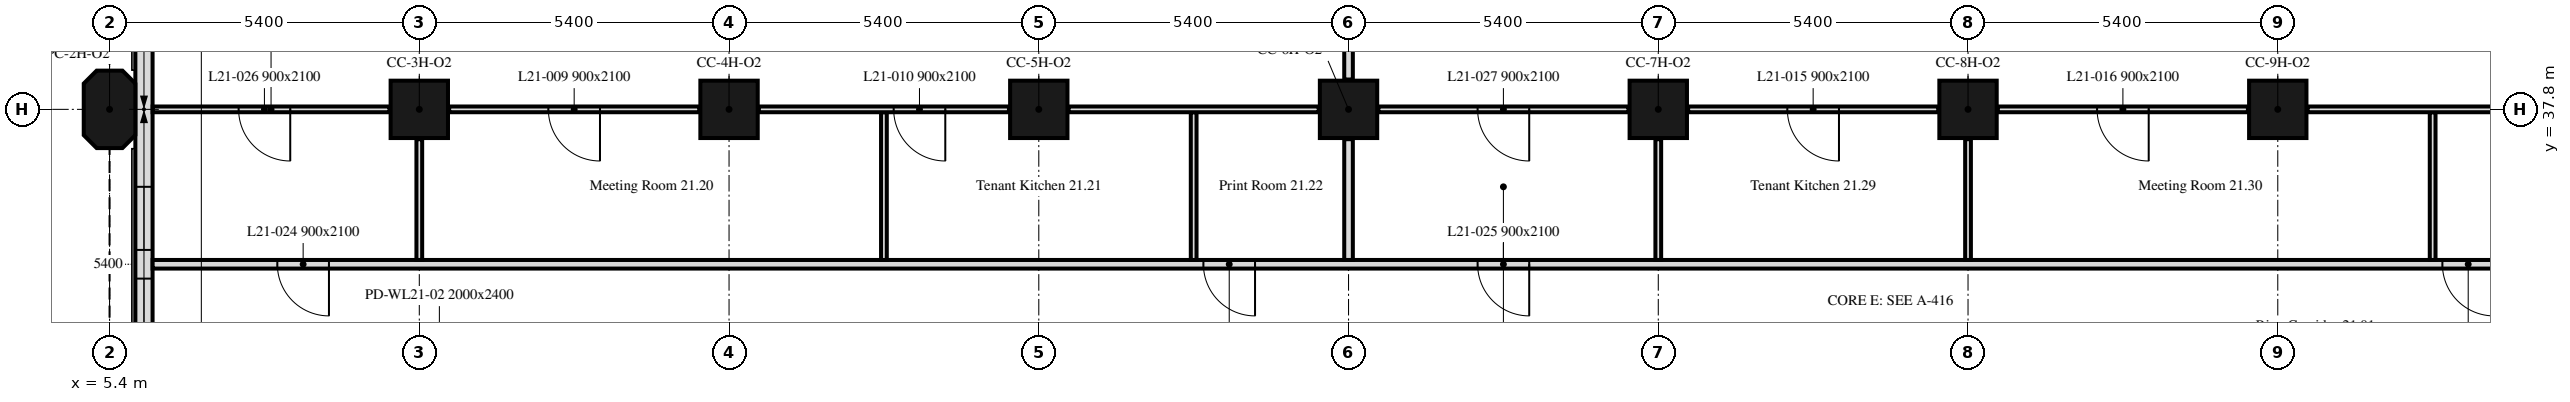
"""IFC4 building model, lengths in metres.
Left out: names, types, materials, properties, quantities, classifications, styles, units other than length and angle.
Written with IfcOpenShell. Run it as: python <this file> out.ifc"""

import sys

from ifc_helpers import new_model, si_unit, direction, frame, frame_2d, origin, origin_2d, place, context, subcontext, project, spatial, polyline, rectangle, outline, extrude, element, fill, save


model = new_model("IFC4")
c1 = context("Model", 3, precision=1e-05, world=origin(), true_north=direction((0.0, 1.0)))
c2 = subcontext(c1, "Body", "Model", "MODEL_VIEW")
j1 = project(units=[si_unit("LENGTHUNIT", "METRE"), si_unit("PLANEANGLEUNIT", "RADIAN")], contexts=[c1])
p1 = place(None, origin())
s1 = spatial("IfcSite", under=j1, at=p1, CompositionType="ELEMENT")
p2 = place(p1, origin())
s2 = spatial("IfcBuilding", under=s1, at=p2, CompositionType="ELEMENT")
p3 = place(p2, frame((0.0, 0.0, 91.6)))
s3 = spatial("IfcBuildingStorey", under=s2, at=p3, CompositionType="ELEMENT", Elevation=91.6)
p4 = place(p3, frame((5.4, 37.8, 0.0), z_axis=(0.0, 0.0, 1.0), x_axis=(0.0, 1.0, 0.0)))
e1 = element("IfcColumn", 1, at=p4, inside=s3, PredefinedType="COLUMN", context=c2, shape_type="SweptSolid", body=[
    extrude(outline(polyline([(-0.45, -0.45), (0.45, -0.45), (0.675, -0.225), (0.675, 0.225), (0.45, 0.45), (-0.45, 0.45), (-0.675, 0.225), (-0.675, -0.225), (-0.45, -0.45)])), origin(), (0.0, 0.0, 1.0), 3.5),
])
for number, where, z_axis, x_axis in (
    (2, (10.8, 37.8, 0.0), (0.0, 0.0, 1.0), (1.0, 0.0, 0.0)),
    (3, (16.2, 37.8, 0.0), (0.0, 0.0, 1.0), (1.0, 0.0, 0.0)),
    (4, (21.6, 37.8, 0.0), (0.0, 0.0, 1.0), (1.0, 0.0, 0.0)),
    (5, (27.0, 37.8, 0.0), (0.0, 0.0, 1.0), (1.0, 0.0, 0.0)),
    (6, (32.4, 37.8, 0.0), (0.0, 0.0, 1.0), (1.0, 0.0, 0.0)),
    (7, (37.8, 37.8, 0.0), (0.0, 0.0, 1.0), (1.0, 0.0, 0.0)),
    (8, (43.2, 37.8, 0.0), (0.0, 0.0, 1.0), (1.0, 0.0, 0.0)),
):
    element("IfcColumn", number, at=place(p3, frame(where, z_axis=z_axis, x_axis=x_axis)), inside=s3, PredefinedType="COLUMN", context=c2, shape_type="SweptSolid", body=[
        extrude(rectangle(XDim=1.0, YDim=1.0, at=origin_2d()), origin(), (0.0, 0.0, 1.0), 3.5),
    ])
p5 = place(p3, frame((6.0, 43.014, 0.0), z_axis=(0.0, 0.0, 1.0), x_axis=(0.0, -1.0, 0.0)))
e9 = element("IfcWall", 9, at=p5, inside=s3, PredefinedType="SOLIDWALL", context=c2, shape_type="SweptSolid", body=[
    extrude(rectangle(XDim=10.614, YDim=0.3, at=frame_2d((5.307, 0.0))), origin(), (0.0, 0.0, 1.0), 3.5),
])
p6 = place(p5, frame((6.564, 0.0, 0.9)))
e10 = element("IfcOpeningElement", 10, at=p6, cuts=e9, PredefinedType="OPENING", context=c2, shape_type="SweptSolid", body=[
    extrude(rectangle(XDim=1.1, YDim=1.7, at=frame_2d((0.55, 0.85))), frame((0.0, 0.16, 0.0), z_axis=(0.0, -1.0, 0.0), x_axis=(1.0, 0.0, 0.0)), (0.0, 0.0, 1.0), 0.32),
])
p7 = place(p5, frame((8.164, 0.0, 0.9)))
e11 = element("IfcOpeningElement", 11, at=p7, cuts=e9, PredefinedType="OPENING", context=c2, shape_type="SweptSolid", body=[
    extrude(rectangle(XDim=1.1, YDim=1.7, at=frame_2d((0.55, 0.85))), frame((0.0, 0.16, 0.0), z_axis=(0.0, -1.0, 0.0), x_axis=(1.0, 0.0, 0.0)), (0.0, 0.0, 1.0), 0.32),
])
p8 = place(p3, frame((47.849, 35.1, 0.0), z_axis=(0.0, 0.0, 1.0), x_axis=(-1.0, 0.0, 0.0)))
e12 = element("IfcWall", 12, at=p8, inside=s3, PredefinedType="PARTITIONING", context=c2, shape_type="SweptSolid", body=[
    extrude(rectangle(XDim=41.698, YDim=0.15, at=frame_2d((20.849, 0.0))), origin(), (0.0, 0.0, 1.0), 2.75),
])
p9 = place(p8, frame((22.479, 0.0, 0.0)))
e13 = element("IfcOpeningElement", 13, at=p9, cuts=e12, PredefinedType="OPENING", context=c2, shape_type="SweptSolid", body=[
    extrude(rectangle(XDim=0.9, YDim=2.1, at=frame_2d((0.45, 1.05))), frame((0.0, 0.075, 0.0), z_axis=(0.0, -1.0, 0.0), x_axis=(1.0, 0.0, 0.0)), (0.0, 0.0, 1.0), 0.15),
])
p10 = place(p8, frame((0.879, 0.0, 0.0)))
e14 = element("IfcOpeningElement", 14, at=p10, cuts=e12, PredefinedType="OPENING", context=c2, shape_type="SweptSolid", body=[
    extrude(rectangle(XDim=0.9, YDim=2.1, at=frame_2d((0.45, 1.05))), frame((0.0, 0.075, 0.0), z_axis=(0.0, -1.0, 0.0), x_axis=(1.0, 0.0, 0.0)), (0.0, 0.0, 1.0), 0.15),
])
p11 = place(p8, frame((38.624, 0.0, 0.0)))
e15 = element("IfcOpeningElement", 15, at=p11, cuts=e12, PredefinedType="OPENING", context=c2, shape_type="SweptSolid", body=[
    extrude(rectangle(XDim=0.9, YDim=2.1, at=frame_2d((0.45, 1.05))), frame((0.0, 0.075, 0.0), z_axis=(0.0, -1.0, 0.0), x_axis=(1.0, 0.0, 0.0)), (0.0, 0.0, 1.0), 0.15),
])
p12 = place(p8, frame((17.699, 0.0, 0.0)))
e16 = element("IfcOpeningElement", 16, at=p12, cuts=e12, PredefinedType="OPENING", context=c2, shape_type="SweptSolid", body=[
    extrude(rectangle(XDim=0.9, YDim=2.1, at=frame_2d((0.45, 1.05))), frame((0.0, 0.075, 0.0), z_axis=(0.0, -1.0, 0.0), x_axis=(1.0, 0.0, 0.0)), (0.0, 0.0, 1.0), 0.15),
])
p13 = place(p3, frame((10.28, 37.8, 0.0), z_axis=(0.0, 0.0, 1.0), x_axis=(-1.0, 0.0, 0.0)))
e17 = element("IfcWall", 17, at=p13, inside=s3, PredefinedType="PARTITIONING", context=c2, shape_type="SweptSolid", body=[
    extrude(rectangle(XDim=4.129, YDim=0.1, at=frame_2d((2.064, 0.0))), origin(), (0.0, 0.0, 1.0), 2.75),
])
p14 = place(p13, frame((1.73, 0.0, 0.0)))
e18 = element("IfcOpeningElement", 18, at=p14, cuts=e17, PredefinedType="OPENING", context=c2, shape_type="SweptSolid", body=[
    extrude(rectangle(XDim=0.9, YDim=2.1, at=frame_2d((0.45, 1.05))), frame((0.0, 0.05, 0.0), z_axis=(0.0, -1.0, 0.0), x_axis=(1.0, 0.0, 0.0)), (0.0, 0.0, 1.0), 0.1),
])
p15 = place(p3, frame((10.8, 35.175, 0.0), z_axis=(0.0, 0.0, 1.0), x_axis=(0.0, 1.0, 0.0)))
e19 = element("IfcWall", 19, at=p15, inside=s3, PredefinedType="PARTITIONING", context=c2, shape_type="SweptSolid", body=[
    extrude(rectangle(XDim=2.105, YDim=0.1, at=frame_2d((1.052, 0.0))), origin(), (0.0, 0.0, 1.0), 2.75),
])
p16 = place(p3, frame((18.9, 35.175, 0.0), z_axis=(0.0, 0.0, 1.0), x_axis=(0.0, 1.0, 0.0)))
e20 = element("IfcWall", 20, at=p16, inside=s3, PredefinedType="PARTITIONING", context=c2, shape_type="SweptSolid", body=[
    extrude(rectangle(XDim=2.575, YDim=0.1, at=frame_2d((1.288, 0.0))), origin(), (0.0, 0.0, 1.0), 3.5),
])
p17 = place(p3, frame((15.68, 37.8, 0.0), z_axis=(0.0, 0.0, 1.0), x_axis=(-1.0, 0.0, 0.0)))
e21 = element("IfcWall", 21, at=p17, inside=s3, PredefinedType="PARTITIONING", context=c2, shape_type="SweptSolid", body=[
    extrude(rectangle(XDim=4.36, YDim=0.1, at=frame_2d((2.18, 0.0))), origin(), (0.0, 0.0, 1.0), 2.75),
])
p18 = place(p17, frame((1.73, 0.0, 0.0)))
e22 = element("IfcOpeningElement", 22, at=p18, cuts=e21, PredefinedType="OPENING", context=c2, shape_type="SweptSolid", body=[
    extrude(rectangle(XDim=0.9, YDim=2.1, at=frame_2d((0.45, 1.05))), frame((0.0, 0.05, 0.0), z_axis=(0.0, -1.0, 0.0), x_axis=(1.0, 0.0, 0.0)), (0.0, 0.0, 1.0), 0.1),
])
p19 = place(p3, frame((24.3, 35.175, 0.0), z_axis=(0.0, 0.0, 1.0), x_axis=(0.0, 1.0, 0.0)))
e23 = element("IfcWall", 23, at=p19, inside=s3, PredefinedType="PARTITIONING", context=c2, shape_type="SweptSolid", body=[
    extrude(rectangle(XDim=2.575, YDim=0.1, at=frame_2d((1.288, 0.0))), origin(), (0.0, 0.0, 1.0), 3.5),
])
p20 = place(p3, frame((21.08, 37.8, 0.0), z_axis=(0.0, 0.0, 1.0), x_axis=(-1.0, 0.0, 0.0)))
e24 = element("IfcWall", 24, at=p20, inside=s3, PredefinedType="PARTITIONING", context=c2, shape_type="SweptSolid", body=[
    extrude(rectangle(XDim=4.36, YDim=0.1, at=frame_2d((2.18, 0.0))), origin(), (0.0, 0.0, 1.0), 3.5),
])
p21 = place(p20, frame((1.11, 0.0, 0.0)))
e25 = element("IfcOpeningElement", 25, at=p21, cuts=e24, PredefinedType="OPENING", context=c2, shape_type="SweptSolid", body=[
    extrude(rectangle(XDim=0.9, YDim=2.1, at=frame_2d((0.45, 1.05))), frame((0.0, 0.05, 0.0), z_axis=(0.0, -1.0, 0.0), x_axis=(1.0, 0.0, 0.0)), (0.0, 0.0, 1.0), 0.1),
])
p22 = place(p3, frame((27.0, 35.175, 0.0), z_axis=(0.0, 0.0, 1.0), x_axis=(0.0, 1.0, 0.0)))
e26 = element("IfcWall", 26, at=p22, inside=s3, PredefinedType="PARTITIONING", context=c2, shape_type="SweptSolid", body=[
    extrude(rectangle(XDim=2.105, YDim=0.15, at=frame_2d((1.052, 0.0))), origin(), (0.0, 0.0, 1.0), 2.75),
])
p23 = place(p3, frame((26.48, 37.8, 0.0), z_axis=(0.0, 0.0, 1.0), x_axis=(-1.0, 0.0, 0.0)))
e27 = element("IfcWall", 27, at=p23, inside=s3, PredefinedType="PARTITIONING", context=c2, shape_type="SweptSolid", body=[
    extrude(rectangle(XDim=4.36, YDim=0.1, at=frame_2d((2.18, 0.0))), origin(), (0.0, 0.0, 1.0), 3.5),
])
p24 = place(p3, frame((27.0, 38.32, 0.0), z_axis=(0.0, 0.0, 1.0), x_axis=(0.0, 1.0, 0.0)))
e28 = element("IfcWall", 28, at=p24, inside=s3, PredefinedType="PARTITIONING", context=c2, shape_type="SweptSolid", body=[
    extrude(rectangle(XDim=4.36, YDim=0.15, at=frame_2d((2.18, 0.0))), origin(), (0.0, 0.0, 1.0), 2.75),
])
p25 = place(p3, frame((32.4, 35.175, 0.0), z_axis=(0.0, 0.0, 1.0), x_axis=(0.0, 1.0, 0.0)))
e29 = element("IfcWall", 29, at=p25, inside=s3, PredefinedType="PARTITIONING", context=c2, shape_type="SweptSolid", body=[
    extrude(rectangle(XDim=2.105, YDim=0.1, at=frame_2d((1.052, 0.0))), origin(), (0.0, 0.0, 1.0), 2.75),
])
p26 = place(p3, frame((31.88, 37.8, 0.0), z_axis=(0.0, 0.0, 1.0), x_axis=(-1.0, 0.0, 0.0)))
e30 = element("IfcWall", 30, at=p26, inside=s3, PredefinedType="PARTITIONING", context=c2, shape_type="SweptSolid", body=[
    extrude(rectangle(XDim=4.36, YDim=0.1, at=frame_2d((2.18, 0.0))), origin(), (0.0, 0.0, 1.0), 3.5),
])
p27 = place(p26, frame((1.73, 0.0, 0.0)))
e31 = element("IfcOpeningElement", 31, at=p27, cuts=e30, PredefinedType="OPENING", context=c2, shape_type="SweptSolid", body=[
    extrude(rectangle(XDim=0.9, YDim=2.1, at=frame_2d((0.45, 1.05))), frame((0.0, 0.05, 0.0), z_axis=(0.0, -1.0, 0.0), x_axis=(1.0, 0.0, 0.0)), (0.0, 0.0, 1.0), 0.1),
])
p28 = place(p3, frame((37.8, 35.175, 0.0), z_axis=(0.0, 0.0, 1.0), x_axis=(0.0, 1.0, 0.0)))
e32 = element("IfcWall", 32, at=p28, inside=s3, PredefinedType="PARTITIONING", context=c2, shape_type="SweptSolid", body=[
    extrude(rectangle(XDim=2.105, YDim=0.1, at=frame_2d((1.052, 0.0))), origin(), (0.0, 0.0, 1.0), 2.75),
])
p29 = place(p3, frame((37.28, 37.8, 0.0), z_axis=(0.0, 0.0, 1.0), x_axis=(-1.0, 0.0, 0.0)))
e33 = element("IfcWall", 33, at=p29, inside=s3, PredefinedType="PARTITIONING", context=c2, shape_type="SweptSolid", body=[
    extrude(rectangle(XDim=4.36, YDim=0.1, at=frame_2d((2.18, 0.0))), origin(), (0.0, 0.0, 1.0), 2.75),
])
p30 = place(p29, frame((1.73, 0.0, 0.0)))
e34 = element("IfcOpeningElement", 34, at=p30, cuts=e33, PredefinedType="OPENING", context=c2, shape_type="SweptSolid", body=[
    extrude(rectangle(XDim=0.9, YDim=2.1, at=frame_2d((0.45, 1.05))), frame((0.0, 0.05, 0.0), z_axis=(0.0, -1.0, 0.0), x_axis=(1.0, 0.0, 0.0)), (0.0, 0.0, 1.0), 0.1),
])
p31 = place(p3, frame((45.9, 35.175, 0.0), z_axis=(0.0, 0.0, 1.0), x_axis=(0.0, 1.0, 0.0)))
e35 = element("IfcWall", 35, at=p31, inside=s3, PredefinedType="PARTITIONING", context=c2, shape_type="SweptSolid", body=[
    extrude(rectangle(XDim=2.575, YDim=0.1, at=frame_2d((1.288, 0.0))), origin(), (0.0, 0.0, 1.0), 3.5),
])
p32 = place(p3, frame((42.68, 37.8, 0.0), z_axis=(0.0, 0.0, 1.0), x_axis=(-1.0, 0.0, 0.0)))
e36 = element("IfcWall", 36, at=p32, inside=s3, PredefinedType="PARTITIONING", context=c2, shape_type="SweptSolid", body=[
    extrude(rectangle(XDim=4.36, YDim=0.1, at=frame_2d((2.18, 0.0))), origin(), (0.0, 0.0, 1.0), 2.75),
])
p33 = place(p32, frame((1.73, 0.0, 0.0)))
e37 = element("IfcOpeningElement", 37, at=p33, cuts=e36, PredefinedType="OPENING", context=c2, shape_type="SweptSolid", body=[
    extrude(rectangle(XDim=0.9, YDim=2.1, at=frame_2d((0.45, 1.05))), frame((0.0, 0.05, 0.0), z_axis=(0.0, -1.0, 0.0), x_axis=(1.0, 0.0, 0.0)), (0.0, 0.0, 1.0), 0.1),
])
p34 = place(p3, frame((47.849, 37.8, 0.0), z_axis=(0.0, 0.0, 1.0), x_axis=(-1.0, 0.0, 0.0)))
e38 = element("IfcWall", 38, at=p34, inside=s3, PredefinedType="PARTITIONING", context=c2, shape_type="SweptSolid", body=[
    extrude(rectangle(XDim=4.129, YDim=0.1, at=frame_2d((2.064, 0.0))), origin(), (0.0, 0.0, 1.0), 2.75),
])
p35 = place(p6, origin())
e39 = element("IfcWindow", 39, at=p35, inside=s3, PartitioningType="SINGLE_PANEL", PredefinedType="WINDOW", context=c2, shape_type="SweptSolid", body=[
    extrude(rectangle(XDim=1.1, YDim=1.7, at=frame_2d((0.55, 0.85))), frame((0.0, 0.03, 0.0), z_axis=(0.0, -1.0, 0.0), x_axis=(1.0, 0.0, 0.0)), (0.0, 0.0, 1.0), 0.06),
])
fill(e10, e39)
p36 = place(p7, origin())
e40 = element("IfcWindow", 40, at=p36, inside=s3, PartitioningType="SINGLE_PANEL", PredefinedType="WINDOW", context=c2, shape_type="SweptSolid", body=[
    extrude(rectangle(XDim=1.1, YDim=1.7, at=frame_2d((0.55, 0.85))), frame((0.0, 0.03, 0.0), z_axis=(0.0, -1.0, 0.0), x_axis=(1.0, 0.0, 0.0)), (0.0, 0.0, 1.0), 0.06),
])
fill(e11, e40)
p37 = place(p9, origin())
e41 = element("IfcDoor", 41, at=p37, inside=s3, OperationType="SINGLE_SWING_LEFT", PredefinedType="DOOR", context=c2, shape_type="SweptSolid", body=[
    extrude(rectangle(XDim=0.9, YDim=2.1, at=frame_2d((0.45, 1.05))), frame((0.0, 0.025, 0.0), z_axis=(0.0, -1.0, 0.0), x_axis=(1.0, 0.0, 0.0)), (0.0, 0.0, 1.0), 0.05),
])
fill(e13, e41)
p38 = place(p10, origin())
e42 = element("IfcDoor", 42, at=p38, inside=s3, OperationType="SINGLE_SWING_LEFT", PredefinedType="DOOR", context=c2, shape_type="SweptSolid", body=[
    extrude(rectangle(XDim=0.9, YDim=2.1, at=frame_2d((0.45, 1.05))), frame((0.0, 0.025, 0.0), z_axis=(0.0, -1.0, 0.0), x_axis=(1.0, 0.0, 0.0)), (0.0, 0.0, 1.0), 0.05),
])
fill(e14, e42)
p39 = place(p18, origin())
e43 = element("IfcDoor", 43, at=p39, inside=s3, OperationType="SINGLE_SWING_RIGHT", PredefinedType="DOOR", context=c2, shape_type="SweptSolid", body=[
    extrude(rectangle(XDim=0.9, YDim=2.1, at=frame_2d((0.45, 1.05))), frame((0.0, 0.025, 0.0), z_axis=(0.0, -1.0, 0.0), x_axis=(1.0, 0.0, 0.0)), (0.0, 0.0, 1.0), 0.05),
])
fill(e22, e43)
p40 = place(p21, origin())
e44 = element("IfcDoor", 44, at=p40, inside=s3, OperationType="SINGLE_SWING_RIGHT", PredefinedType="DOOR", context=c2, shape_type="SweptSolid", body=[
    extrude(rectangle(XDim=0.9, YDim=2.1, at=frame_2d((0.45, 1.05))), frame((0.0, 0.025, 0.0), z_axis=(0.0, -1.0, 0.0), x_axis=(1.0, 0.0, 0.0)), (0.0, 0.0, 1.0), 0.05),
])
fill(e25, e44)
p41 = place(p30, origin())
e45 = element("IfcDoor", 45, at=p41, inside=s3, OperationType="SINGLE_SWING_LEFT", PredefinedType="DOOR", context=c2, shape_type="SweptSolid", body=[
    extrude(rectangle(XDim=0.9, YDim=2.1, at=frame_2d((0.45, 1.05))), frame((0.0, 0.025, 0.0), z_axis=(0.0, -1.0, 0.0), x_axis=(1.0, 0.0, 0.0)), (0.0, 0.0, 1.0), 0.05),
])
fill(e34, e45)
p42 = place(p33, origin())
e46 = element("IfcDoor", 46, at=p42, inside=s3, OperationType="SINGLE_SWING_LEFT", PredefinedType="DOOR", context=c2, shape_type="SweptSolid", body=[
    extrude(rectangle(XDim=0.9, YDim=2.1, at=frame_2d((0.45, 1.05))), frame((0.0, 0.025, 0.0), z_axis=(0.0, -1.0, 0.0), x_axis=(1.0, 0.0, 0.0)), (0.0, 0.0, 1.0), 0.05),
])
fill(e37, e46)
p43 = place(p11, origin())
e47 = element("IfcDoor", 47, at=p43, inside=s3, OperationType="SINGLE_SWING_LEFT", PredefinedType="DOOR", context=c2, shape_type="SweptSolid", body=[
    extrude(rectangle(XDim=0.9, YDim=2.1, at=frame_2d((0.45, 1.05))), frame((0.0, 0.025, 0.0), z_axis=(0.0, -1.0, 0.0), x_axis=(1.0, 0.0, 0.0)), (0.0, 0.0, 1.0), 0.05),
])
fill(e15, e47)
p44 = place(p12, origin())
e48 = element("IfcDoor", 48, at=p44, inside=s3, OperationType="SINGLE_SWING_LEFT", PredefinedType="DOOR", context=c2, shape_type="SweptSolid", body=[
    extrude(rectangle(XDim=0.9, YDim=2.1, at=frame_2d((0.45, 1.05))), frame((0.0, 0.025, 0.0), z_axis=(0.0, -1.0, 0.0), x_axis=(1.0, 0.0, 0.0)), (0.0, 0.0, 1.0), 0.05),
])
fill(e16, e48)
p45 = place(p14, origin())
e49 = element("IfcDoor", 49, at=p45, inside=s3, OperationType="SINGLE_SWING_LEFT", PredefinedType="DOOR", context=c2, shape_type="SweptSolid", body=[
    extrude(rectangle(XDim=0.9, YDim=2.1, at=frame_2d((0.45, 1.05))), frame((0.0, 0.025, 0.0), z_axis=(0.0, -1.0, 0.0), x_axis=(1.0, 0.0, 0.0)), (0.0, 0.0, 1.0), 0.05),
])
fill(e18, e49)
p46 = place(p27, origin())
e50 = element("IfcDoor", 50, at=p46, inside=s3, OperationType="SINGLE_SWING_RIGHT", PredefinedType="DOOR", context=c2, shape_type="SweptSolid", body=[
    extrude(rectangle(XDim=0.9, YDim=2.1, at=frame_2d((0.45, 1.05))), frame((0.0, 0.025, 0.0), z_axis=(0.0, -1.0, 0.0), x_axis=(1.0, 0.0, 0.0)), (0.0, 0.0, 1.0), 0.05),
])
fill(e31, e50)
save(model, sys.argv[1])
